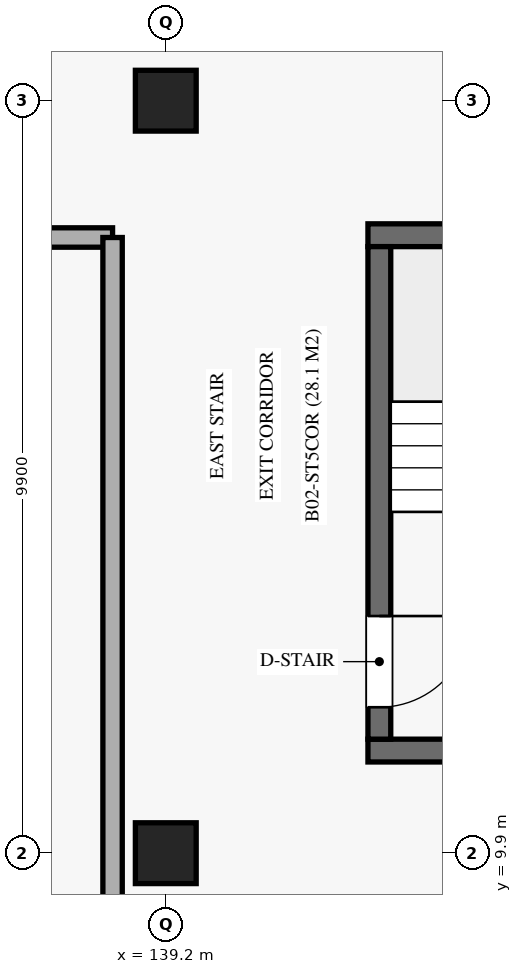
"""IFC4 building model, lengths in metres.
Left out: names, types, materials, properties, quantities, classifications, styles, units other than length and angle.
Written with IfcOpenShell. Run it as: python <this file> out.ifc"""

import sys

from ifc_helpers import new_model, si_unit, direction, frame, frame_2d, origin, origin_2d, place, context, subcontext, project, spatial, rectangle, extrude, element, fill, save


model = new_model("IFC4")
c1 = context("Model", 3, precision=1e-05, world=origin(), true_north=direction((0.0, 1.0)))
c2 = subcontext(c1, "Body", "Model", "MODEL_VIEW")
j1 = project(units=[si_unit("LENGTHUNIT", "METRE"), si_unit("PLANEANGLEUNIT", "RADIAN")], contexts=[c1])
p1 = place(None, origin())
s1 = spatial("IfcSite", under=j1, at=p1, CompositionType="ELEMENT")
p2 = place(p1, origin())
s2 = spatial("IfcBuilding", under=s1, at=p2, CompositionType="ELEMENT")
p3 = place(p2, frame((0.0, 0.0, -9.18)))
s3 = spatial("IfcBuildingStorey", under=s2, at=p3, CompositionType="ELEMENT", Elevation=-9.18)
for number, where, z_axis, x_axis in (
    (1, (139.2, 9.9, 0.0), (0.0, 0.0, 1.0), (1.0, 0.0, 0.0)),
    (2, (139.2, 19.8, 0.0), (0.0, 0.0, 1.0), (1.0, 0.0, 0.0)),
):
    element("IfcColumn", number, at=place(p3, frame(where, z_axis=z_axis, x_axis=x_axis)), inside=s3, PredefinedType="COLUMN", context=c2, shape_type="SweptSolid", body=[
        extrude(rectangle(XDim=0.8, YDim=0.8, at=origin_2d()), origin(), (0.0, 0.0, 1.0), 4.59),
    ])
for number, where, z_axis, x_axis in (
    (3, (141.86, 11.25, 0.0), (0.0, 0.0, 1.0), (1.0, 0.0, 0.0)),
    (4, (141.86, 18.03, 0.0), (0.0, 0.0, 1.0), (1.0, 0.0, 0.0)),
):
    element("IfcWall", number, at=place(p3, frame(where, z_axis=z_axis, x_axis=x_axis)), inside=s3, PredefinedType="SHEAR", context=c2, shape_type="SweptSolid", body=[
        extrude(rectangle(XDim=7.08, YDim=0.3, at=frame_2d((3.54, 0.0))), origin(), (0.0, 0.0, 1.0), 4.31),
    ])
p4 = place(p3, frame((142.01, 11.4, 0.0), z_axis=(0.0, 0.0, 1.0), x_axis=(0.0, 1.0, 0.0)))
e5 = element("IfcWall", 5, at=p4, inside=s3, PredefinedType="SHEAR", context=c2, shape_type="SweptSolid", body=[
    extrude(rectangle(XDim=6.48, YDim=0.3, at=frame_2d((3.24, 0.0))), origin(), (0.0, 0.0, 1.0), 4.31),
])
p5 = place(p4, frame((0.42, 0.0, 0.0)))
e6 = element("IfcOpeningElement", 6, at=p5, cuts=e5, PredefinedType="OPENING", context=c2, shape_type="SweptSolid", body=[
    extrude(rectangle(XDim=1.2, YDim=2.2, at=frame_2d((0.6, 1.1))), frame((0.0, 0.16, 0.0), z_axis=(0.0, -1.0, 0.0), x_axis=(1.0, 0.0, 0.0)), (0.0, 0.0, 1.0), 0.32),
])
p6 = place(p3, frame((114.6, 18.0, 0.0), z_axis=(0.0, 0.0, 1.0), x_axis=(1.0, 0.0, 0.0)))
e7 = element("IfcWall", 7, at=p6, inside=s3, PredefinedType="SOLIDWALL", context=c2, shape_type="SweptSolid", body=[
    extrude(rectangle(XDim=23.9, YDim=0.255, at=frame_2d((11.95, 0.0))), origin(), (0.0, 0.0, 1.0), 3.43),
])
p7 = place(p6, frame((14.0, 0.0, 0.0)))
e8 = element("IfcOpeningElement", 8, at=p7, cuts=e7, PredefinedType="OPENING", context=c2, shape_type="SweptSolid", body=[
    extrude(rectangle(XDim=1.8, YDim=2.35, at=frame_2d((0.9, 1.175))), frame((0.0, 0.137, 0.0), z_axis=(0.0, -1.0, 0.0), x_axis=(1.0, 0.0, 0.0)), (0.0, 0.0, 1.0), 0.275),
])
p8 = place(p3, frame((138.5, 0.6, 0.0), z_axis=(0.0, 0.0, 1.0), x_axis=(0.0, 1.0, 0.0)))
e9 = element("IfcWall", 9, at=p8, inside=s3, PredefinedType="SOLIDWALL", context=c2, shape_type="SweptSolid", body=[
    extrude(rectangle(XDim=17.4, YDim=0.255, at=frame_2d((8.7, 0.0))), origin(), (0.0, 0.0, 1.0), 3.43),
])
p9 = place(p5, frame((1.2, 0.0, 0.0), z_axis=(0.0, 0.0, 1.0), x_axis=(-1.0, 0.0, 0.0)))
e10 = element("IfcDoor", 10, at=p9, inside=s3, OperationType="SINGLE_SWING_LEFT", PredefinedType="DOOR", context=c2, shape_type="SweptSolid", body=[
    extrude(rectangle(XDim=1.2, YDim=2.2, at=frame_2d((0.6, 1.1))), frame((0.0, 0.025, 0.0), z_axis=(0.0, -1.0, 0.0), x_axis=(1.0, 0.0, 0.0)), (0.0, 0.0, 1.0), 0.05),
])
fill(e6, e10)
save(model, sys.argv[1])
